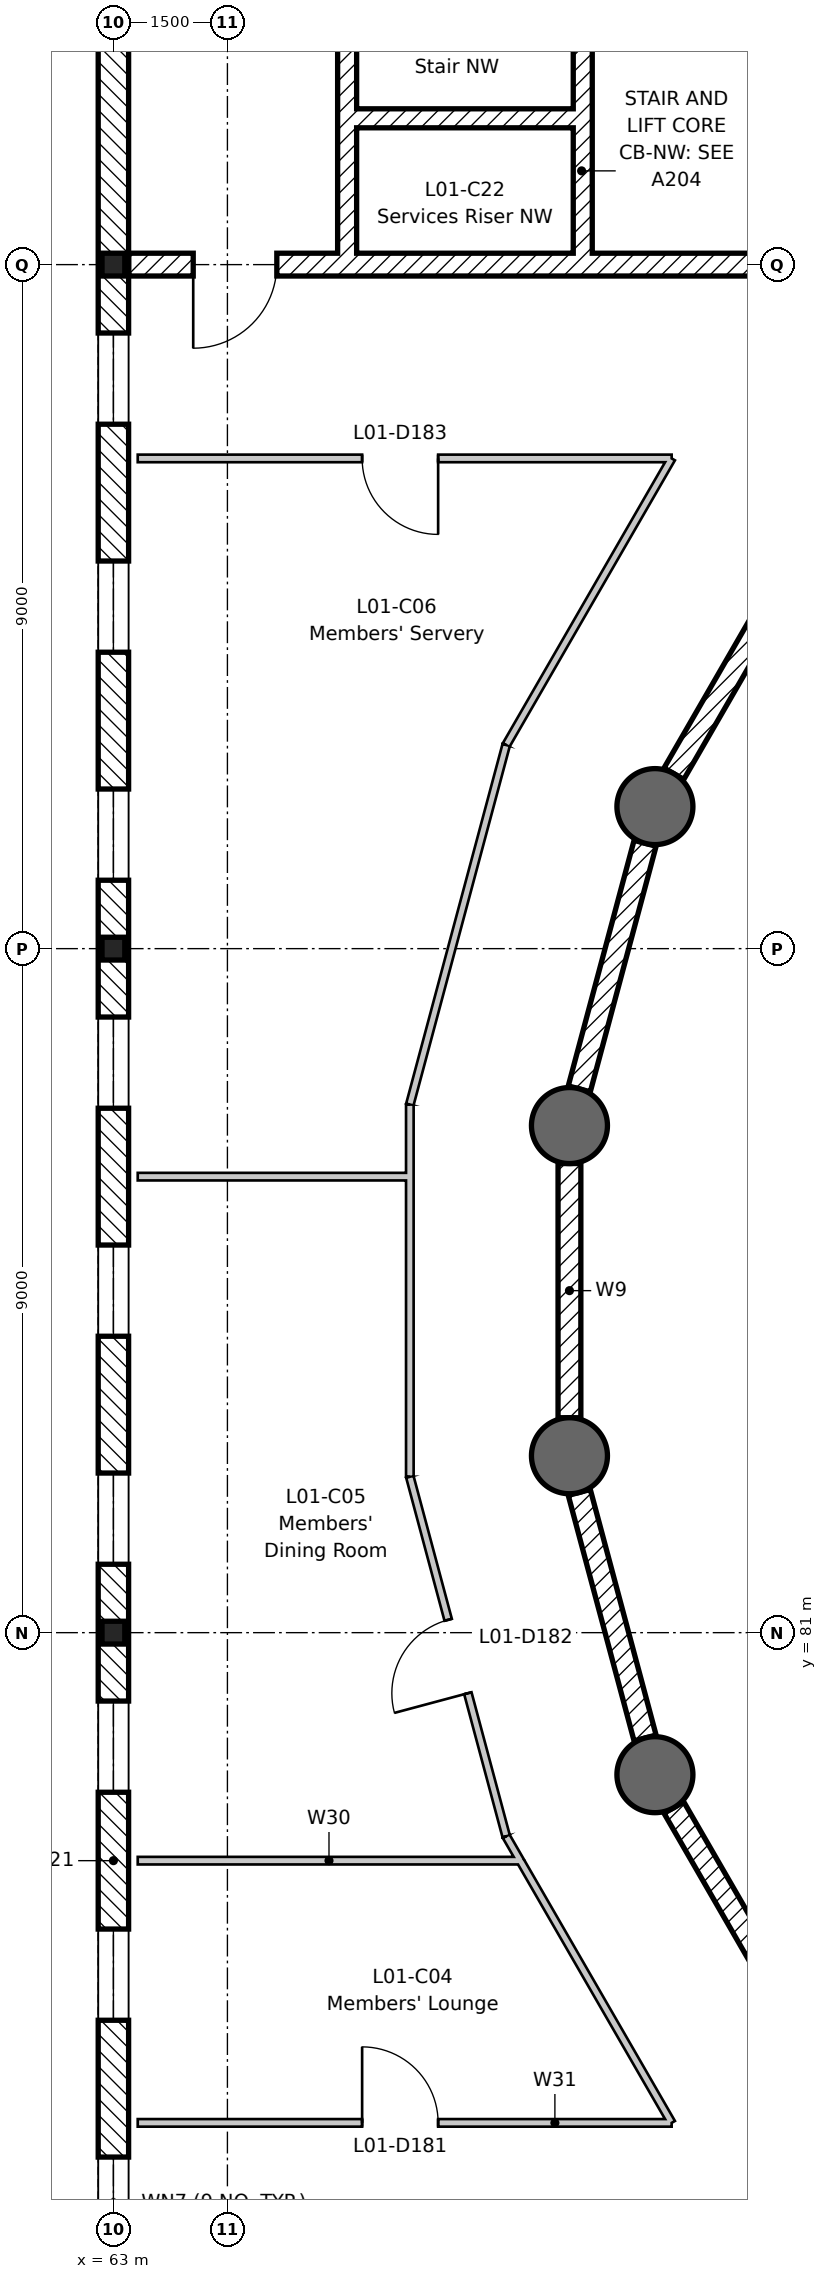
"""IFC4 building model, lengths in metres.
Left out: names, types, materials, properties, quantities, classifications, styles, units other than length and angle.
Written with IfcOpenShell. Run it as: python <this file> out.ifc"""

import sys

from ifc_helpers import new_model, si_unit, direction, frame, frame_2d, origin, origin_2d, place, context, subcontext, project, spatial, rectangle, circle, i_section, extrude, element, fill, save


model = new_model("IFC4")
c1 = context("Model", 3, precision=1e-05, world=origin(), true_north=direction((0.0, 1.0)))
c2 = subcontext(c1, "Body", "Model", "MODEL_VIEW")
j1 = project(units=[si_unit("LENGTHUNIT", "METRE"), si_unit("PLANEANGLEUNIT", "RADIAN")], contexts=[c1])
p1 = place(None, origin())
s1 = spatial("IfcSite", under=j1, at=p1, CompositionType="ELEMENT")
p2 = place(p1, origin())
s2 = spatial("IfcBuilding", under=s1, at=p2, CompositionType="ELEMENT")
p3 = place(p2, frame((0.0, 0.0, 5.4)))
s3 = spatial("IfcBuildingStorey", under=s2, at=p3, CompositionType="ELEMENT", Elevation=5.4)
for number, where, z_axis, x_axis in (
    (1, (70.125, 91.869, -0.2), (0.0, 0.0, 1.0), (1.0, 0.0, 0.0)),
    (2, (69.0, 87.672, -0.2), (0.0, 0.0, 1.0), (1.0, 0.0, 0.0)),
    (3, (69.0, 83.328, -0.2), (0.0, 0.0, 1.0), (1.0, 0.0, 0.0)),
    (4, (70.125, 79.131, -0.2), (0.0, 0.0, 1.0), (1.0, 0.0, 0.0)),
):
    element("IfcColumn", number, at=place(p3, frame(where, z_axis=z_axis, x_axis=x_axis)), inside=s3, PredefinedType="COLUMN", context=c2, shape_type="SweptSolid", body=[
        extrude(circle(Radius=0.5, at=origin_2d()), origin(), (0.0, 0.0, 1.0), 2.7),
    ])
for number, where, z_axis, x_axis in (
    (5, (63.0, 81.0, -0.2), (0.0, 0.0, 1.0), (1.0, 0.0, 0.0)),
    (6, (63.0, 90.0, -0.2), (0.0, 0.0, 1.0), (1.0, 0.0, 0.0)),
    (7, (63.0, 99.0, -0.2), (0.0, 0.0, 1.0), (1.0, 0.0, 0.0)),
):
    element("IfcColumn", number, at=place(p3, frame(where, z_axis=z_axis, x_axis=x_axis)), inside=s3, PredefinedType="COLUMN", context=c2, shape_type="SweptSolid", body=[
        extrude(i_section(OverallWidth=0.3, OverallDepth=0.3, WebThickness=0.011, FlangeThickness=0.019, FilletRadius=0.027, at=origin_2d()), origin(), (0.0, 0.0, 1.0), 4.5),
    ])
for number, where, z_axis, x_axis in (
    (8, (72.047, 95.198, 0.0), (0.0, 0.0, 1.0), (-0.5, -0.866, 0.0)),
    (9, (69.995, 91.386, 0.0), (0.0, 0.0, 1.0), (-0.259, -0.966, 0.0)),
):
    element("IfcWall", number, at=place(p3, frame(where, z_axis=z_axis, x_axis=x_axis)), inside=s3, PredefinedType="PARTITIONING", context=c2, shape_type="SweptSolid", body=[
        extrude(rectangle(XDim=3.344, YDim=0.3, at=frame_2d((1.672, 0.0))), origin(), (0.0, 0.0, 1.0), 2.5),
    ])
p4 = place(p3, frame((69.0, 87.172, 0.0), z_axis=(0.0, 0.0, 1.0), x_axis=(0.0, -1.0, 0.0)))
e10 = element("IfcWall", 10, at=p4, inside=s3, PredefinedType="PARTITIONING", context=c2, shape_type="SweptSolid", body=[
    extrude(rectangle(XDim=3.345, YDim=0.3, at=frame_2d((1.672, 0.0))), origin(), (0.0, 0.0, 1.0), 2.5),
])
for number, where, z_axis, x_axis in (
    (11, (69.129, 82.845, 0.0), (0.0, 0.0, 1.0), (0.259, -0.966, 0.0)),
    (12, (70.375, 78.698, 0.0), (0.0, 0.0, 1.0), (0.5, -0.866, 0.0)),
):
    element("IfcWall", number, at=place(p3, frame(where, z_axis=z_axis, x_axis=x_axis)), inside=s3, PredefinedType="PARTITIONING", context=c2, shape_type="SweptSolid", body=[
        extrude(rectangle(XDim=3.344, YDim=0.3, at=frame_2d((1.672, 0.0))), origin(), (0.0, 0.0, 1.0), 2.5),
    ])
p5 = place(p3, frame((63.2, 99.0, 0.0), z_axis=(0.0, 0.0, 1.0), x_axis=(1.0, 0.0, 0.0)))
e13 = element("IfcWall", 13, at=p5, inside=s3, PredefinedType="SHEAR", context=c2, shape_type="SweptSolid", body=[
    extrude(rectangle(XDim=8.95, YDim=0.3, at=frame_2d((4.475, 0.0))), origin(), (0.0, 0.0, 1.0), 4.3),
])
p6 = place(p5, frame((0.85, 0.0, 0.0)))
e14 = element("IfcOpeningElement", 14, at=p6, cuts=e13, PredefinedType="OPENING", context=c2, shape_type="SweptSolid", body=[
    extrude(rectangle(XDim=1.1, YDim=2.1, at=frame_2d((0.55, 1.05))), frame((0.0, 0.16, 0.0), z_axis=(0.0, -1.0, 0.0), x_axis=(1.0, 0.0, 0.0)), (0.0, 0.0, 1.0), 0.32),
])
p7 = place(p3, frame((66.075, 107.8, 0.0), z_axis=(0.0, 0.0, 1.0), x_axis=(0.0, -1.0, 0.0)))
e15 = element("IfcWall", 15, at=p7, inside=s3, PredefinedType="SHEAR", context=c2, shape_type="SweptSolid", body=[
    extrude(rectangle(XDim=8.65, YDim=0.25, at=frame_2d((4.325, 0.0))), origin(), (0.0, 0.0, 1.0), 4.3),
])
p8 = place(p7, frame((0.4, 0.0, 0.0)))
e16 = element("IfcOpeningElement", 16, at=p8, cuts=e15, PredefinedType="OPENING", context=c2, shape_type="SweptSolid", body=[
    extrude(rectangle(XDim=1.0, YDim=2.1, at=frame_2d((0.5, 1.05))), frame((0.0, 0.135, 0.0), z_axis=(0.0, -1.0, 0.0), x_axis=(1.0, 0.0, 0.0)), (0.0, 0.0, 1.0), 0.27),
])
p9 = place(p3, frame((69.175, 107.8, 0.0), z_axis=(0.0, 0.0, 1.0), x_axis=(0.0, -1.0, 0.0)))
e17 = element("IfcWall", 17, at=p9, inside=s3, PredefinedType="SHEAR", context=c2, shape_type="SweptSolid", body=[
    extrude(rectangle(XDim=8.65, YDim=0.25, at=frame_2d((4.325, 0.0))), origin(), (0.0, 0.0, 1.0), 4.3),
])
p10 = place(p3, frame((66.2, 100.925, 0.0), z_axis=(0.0, 0.0, 1.0), x_axis=(1.0, 0.0, 0.0)))
e18 = element("IfcWall", 18, at=p10, inside=s3, PredefinedType="SHEAR", context=c2, shape_type="SweptSolid", body=[
    extrude(rectangle(XDim=2.85, YDim=0.25, at=frame_2d((1.425, 0.0))), origin(), (0.0, 0.0, 1.0), 4.3),
])
p11 = place(p3, frame((63.0, 72.0, 0.0), z_axis=(0.0, 0.0, 1.0), x_axis=(0.0, 1.0, 0.0)))
e19 = element("IfcWall", 19, at=p11, inside=s3, PredefinedType="STANDARD", context=c2, shape_type="SweptSolid", body=[
    extrude(rectangle(XDim=27.0, YDim=0.4, at=frame_2d((13.5, 0.0))), origin(), (0.0, 0.0, 1.0), 3.81),
])
p12 = place(p11, frame((0.9, 0.0, 0.9)))
e20 = element("IfcOpeningElement", 20, at=p12, cuts=e19, PredefinedType="OPENING", context=c2, shape_type="SweptSolid", body=[
    extrude(rectangle(XDim=1.2, YDim=2.4, at=frame_2d((0.6, 1.2))), frame((0.0, 0.21, 0.0), z_axis=(0.0, -1.0, 0.0), x_axis=(1.0, 0.0, 0.0)), (0.0, 0.0, 1.0), 0.42),
])
p13 = place(p11, frame((3.9, 0.0, 0.9)))
e21 = element("IfcOpeningElement", 21, at=p13, cuts=e19, PredefinedType="OPENING", context=c2, shape_type="SweptSolid", body=[
    extrude(rectangle(XDim=1.2, YDim=2.4, at=frame_2d((0.6, 1.2))), frame((0.0, 0.21, 0.0), z_axis=(0.0, -1.0, 0.0), x_axis=(1.0, 0.0, 0.0)), (0.0, 0.0, 1.0), 0.42),
])
p14 = place(p11, frame((6.9, 0.0, 0.9)))
e22 = element("IfcOpeningElement", 22, at=p14, cuts=e19, PredefinedType="OPENING", context=c2, shape_type="SweptSolid", body=[
    extrude(rectangle(XDim=1.2, YDim=2.4, at=frame_2d((0.6, 1.2))), frame((0.0, 0.21, 0.0), z_axis=(0.0, -1.0, 0.0), x_axis=(1.0, 0.0, 0.0)), (0.0, 0.0, 1.0), 0.42),
])
p15 = place(p11, frame((9.9, 0.0, 0.9)))
e23 = element("IfcOpeningElement", 23, at=p15, cuts=e19, PredefinedType="OPENING", context=c2, shape_type="SweptSolid", body=[
    extrude(rectangle(XDim=1.2, YDim=2.4, at=frame_2d((0.6, 1.2))), frame((0.0, 0.21, 0.0), z_axis=(0.0, -1.0, 0.0), x_axis=(1.0, 0.0, 0.0)), (0.0, 0.0, 1.0), 0.42),
])
p16 = place(p11, frame((12.9, 0.0, 0.9)))
e24 = element("IfcOpeningElement", 24, at=p16, cuts=e19, PredefinedType="OPENING", context=c2, shape_type="SweptSolid", body=[
    extrude(rectangle(XDim=1.2, YDim=2.4, at=frame_2d((0.6, 1.2))), frame((0.0, 0.21, 0.0), z_axis=(0.0, -1.0, 0.0), x_axis=(1.0, 0.0, 0.0)), (0.0, 0.0, 1.0), 0.42),
])
p17 = place(p11, frame((15.9, 0.0, 0.9)))
e25 = element("IfcOpeningElement", 25, at=p17, cuts=e19, PredefinedType="OPENING", context=c2, shape_type="SweptSolid", body=[
    extrude(rectangle(XDim=1.2, YDim=2.4, at=frame_2d((0.6, 1.2))), frame((0.0, 0.21, 0.0), z_axis=(0.0, -1.0, 0.0), x_axis=(1.0, 0.0, 0.0)), (0.0, 0.0, 1.0), 0.42),
])
p18 = place(p11, frame((18.9, 0.0, 0.9)))
e26 = element("IfcOpeningElement", 26, at=p18, cuts=e19, PredefinedType="OPENING", context=c2, shape_type="SweptSolid", body=[
    extrude(rectangle(XDim=1.2, YDim=2.4, at=frame_2d((0.6, 1.2))), frame((0.0, 0.21, 0.0), z_axis=(0.0, -1.0, 0.0), x_axis=(1.0, 0.0, 0.0)), (0.0, 0.0, 1.0), 0.42),
])
p19 = place(p11, frame((21.9, 0.0, 0.9)))
e27 = element("IfcOpeningElement", 27, at=p19, cuts=e19, PredefinedType="OPENING", context=c2, shape_type="SweptSolid", body=[
    extrude(rectangle(XDim=1.2, YDim=2.4, at=frame_2d((0.6, 1.2))), frame((0.0, 0.21, 0.0), z_axis=(0.0, -1.0, 0.0), x_axis=(1.0, 0.0, 0.0)), (0.0, 0.0, 1.0), 0.42),
])
p20 = place(p11, frame((24.9, 0.0, 0.9)))
e28 = element("IfcOpeningElement", 28, at=p20, cuts=e19, PredefinedType="OPENING", context=c2, shape_type="SweptSolid", body=[
    extrude(rectangle(XDim=1.2, YDim=2.4, at=frame_2d((0.6, 1.2))), frame((0.0, 0.21, 0.0), z_axis=(0.0, -1.0, 0.0), x_axis=(1.0, 0.0, 0.0)), (0.0, 0.0, 1.0), 0.42),
])
p21 = place(p3, frame((63.0, 99.0, 0.0), z_axis=(0.0, 0.0, 1.0), x_axis=(0.0, 1.0, 0.0)))
e29 = element("IfcWall", 29, at=p21, inside=s3, PredefinedType="STANDARD", context=c2, shape_type="SweptSolid", body=[
    extrude(rectangle(XDim=4.4, YDim=0.4, at=frame_2d((2.2, 0.0))), origin(), (0.0, 0.0, 1.0), 4.3),
])
p22 = place(p3, frame((68.353, 78.0, 0.0), z_axis=(0.0, 0.0, 1.0), x_axis=(-1.0, 0.0, 0.0)))
e30 = element("IfcWall", 30, at=p22, inside=s3, PredefinedType="PARTITIONING", context=c2, shape_type="SweptSolid", body=[
    extrude(rectangle(XDim=5.033, YDim=0.1, at=frame_2d((2.516, 0.0))), origin(), (0.0, 0.0, 1.0), 3.81),
])
p23 = place(p3, frame((63.32, 74.55, 0.0), z_axis=(0.0, 0.0, 1.0), x_axis=(1.0, 0.0, 0.0)))
e31 = element("IfcWall", 31, at=p23, inside=s3, PredefinedType="PARTITIONING", context=c2, shape_type="SweptSolid", body=[
    extrude(rectangle(XDim=7.024, YDim=0.1, at=frame_2d((3.512, 0.0))), origin(), (0.0, 0.0, 1.0), 3.81),
])
p24 = place(p23, frame((2.952, 0.0, 0.0)))
e32 = element("IfcOpeningElement", 32, at=p24, cuts=e31, PredefinedType="OPENING", context=c2, shape_type="SweptSolid", body=[
    extrude(rectangle(XDim=1.0, YDim=2.1, at=frame_2d((0.5, 1.05))), frame((0.0, 0.06, 0.0), z_axis=(0.0, -1.0, 0.0), x_axis=(1.0, 0.0, 0.0)), (0.0, 0.0, 1.0), 0.12),
])
p25 = place(p3, frame((70.344, 74.55, 0.0), z_axis=(0.0, 0.0, 1.0), x_axis=(-0.500005512359, 0.866022221199, 0.0)))
e33 = element("IfcWall", 33, at=p25, inside=s3, PredefinedType="PARTITIONING", context=c2, shape_type="SweptSolid", body=[
    extrude(rectangle(XDim=4.007, YDim=0.1, at=frame_2d((2.003, 0.0))), origin(), (0.0, 0.0, 1.0), 3.81),
])
p26 = place(p3, frame((66.9, 87.0, 0.0), z_axis=(0.0, 0.0, 1.0), x_axis=(-1.0, 0.0, 0.0)))
e34 = element("IfcWall", 34, at=p26, inside=s3, PredefinedType="PARTITIONING", context=c2, shape_type="SweptSolid", body=[
    extrude(rectangle(XDim=3.58, YDim=0.1, at=frame_2d((1.79, 0.0))), origin(), (0.0, 0.0, 1.0), 3.81),
])
p27 = place(p3, frame((68.363, 77.983, 0.0), z_axis=(0.0, 0.0, 1.0), x_axis=(-0.500173430036, 0.86592525075, 0.0)))
e35 = element("IfcWall", 35, at=p27, inside=s3, PredefinedType="PARTITIONING", context=c2, shape_type="SweptSolid", body=[
    extrude(rectangle(XDim=0.39, YDim=0.1, at=frame_2d((0.195, 0.0))), origin(), (0.0, 0.0, 1.0), 3.81),
])
p28 = place(p3, frame((68.167, 78.321, 0.0), z_axis=(0.0, 0.0, 1.0), x_axis=(-0.258829112515, 0.965923128678, 0.0)))
e36 = element("IfcWall", 36, at=p28, inside=s3, PredefinedType="PARTITIONING", context=c2, shape_type="SweptSolid", body=[
    extrude(rectangle(XDim=4.897, YDim=0.1, at=frame_2d((2.449, 0.0))), origin(), (0.0, 0.0, 1.0), 3.81),
])
p29 = place(p28, frame((1.949, 0.0, 0.0)))
e37 = element("IfcOpeningElement", 37, at=p29, cuts=e36, PredefinedType="OPENING", context=c2, shape_type="SweptSolid", body=[
    extrude(rectangle(XDim=1.0, YDim=2.1, at=frame_2d((0.5, 1.05))), frame((0.0, 0.06, 0.0), z_axis=(0.0, -1.0, 0.0), x_axis=(1.0, 0.0, 0.0)), (0.0, 0.0, 1.0), 0.12),
])
p30 = place(p3, frame((66.9, 83.051, 0.0), z_axis=(0.0, 0.0, 1.0), x_axis=(0.0, 1.0, 0.0)))
e38 = element("IfcWall", 38, at=p30, inside=s3, PredefinedType="PARTITIONING", context=c2, shape_type="SweptSolid", body=[
    extrude(rectangle(XDim=3.969, YDim=0.1, at=frame_2d((1.984, 0.0))), origin(), (0.0, 0.0, 1.0), 3.81),
])
p31 = place(p3, frame((66.9, 86.98, 0.0), z_axis=(0.0, 0.0, 1.0), x_axis=(0.0, 1.0, 0.0)))
e39 = element("IfcWall", 39, at=p31, inside=s3, PredefinedType="PARTITIONING", context=c2, shape_type="SweptSolid", body=[
    extrude(rectangle(XDim=0.969, YDim=0.1, at=frame_2d((0.484, 0.0))), origin(), (0.0, 0.0, 1.0), 3.81),
])
p32 = place(p3, frame((66.9, 87.949, 0.0), z_axis=(0.0, 0.0, 1.0), x_axis=(0.258829112515, 0.965923128678, 0.0)))
e40 = element("IfcWall", 40, at=p32, inside=s3, PredefinedType="PARTITIONING", context=c2, shape_type="SweptSolid", body=[
    extrude(rectangle(XDim=4.897, YDim=0.1, at=frame_2d((2.449, 0.0))), origin(), (0.0, 0.0, 1.0), 3.81),
])
p33 = place(p3, frame((68.167, 92.679, 0.0), z_axis=(0.0, 0.0, 1.0), x_axis=(0.499992644437, 0.866029650479, 0.0)))
e41 = element("IfcWall", 41, at=p33, inside=s3, PredefinedType="PARTITIONING", context=c2, shape_type="SweptSolid", body=[
    extrude(rectangle(XDim=4.354, YDim=0.1, at=frame_2d((2.177, 0.0))), origin(), (0.0, 0.0, 1.0), 3.81),
])
p34 = place(p3, frame((70.344, 96.45, 0.0), z_axis=(0.0, 0.0, 1.0), x_axis=(-1.0, 0.0, 0.0)))
e42 = element("IfcWall", 42, at=p34, inside=s3, PredefinedType="PARTITIONING", context=c2, shape_type="SweptSolid", body=[
    extrude(rectangle(XDim=7.024, YDim=0.1, at=frame_2d((3.512, 0.0))), origin(), (0.0, 0.0, 1.0), 3.81),
])
p35 = place(p34, frame((3.072, 0.0, 0.0)))
e43 = element("IfcOpeningElement", 43, at=p35, cuts=e42, PredefinedType="OPENING", context=c2, shape_type="SweptSolid", body=[
    extrude(rectangle(XDim=1.0, YDim=2.1, at=frame_2d((0.5, 1.05))), frame((0.0, 0.06, 0.0), z_axis=(0.0, -1.0, 0.0), x_axis=(1.0, 0.0, 0.0)), (0.0, 0.0, 1.0), 0.12),
])
p36 = place(p12, origin())
e44 = element("IfcWindow", 44, at=p36, inside=s3, PartitioningType="SINGLE_PANEL", PredefinedType="WINDOW", context=c2, shape_type="SweptSolid", body=[
    extrude(rectangle(XDim=1.2, YDim=2.4, at=frame_2d((0.6, 1.2))), frame((0.0, 0.03, 0.0), z_axis=(0.0, -1.0, 0.0), x_axis=(1.0, 0.0, 0.0)), (0.0, 0.0, 1.0), 0.06),
])
fill(e20, e44)
p37 = place(p13, origin())
e45 = element("IfcWindow", 45, at=p37, inside=s3, PartitioningType="SINGLE_PANEL", PredefinedType="WINDOW", context=c2, shape_type="SweptSolid", body=[
    extrude(rectangle(XDim=1.2, YDim=2.4, at=frame_2d((0.6, 1.2))), frame((0.0, 0.03, 0.0), z_axis=(0.0, -1.0, 0.0), x_axis=(1.0, 0.0, 0.0)), (0.0, 0.0, 1.0), 0.06),
])
fill(e21, e45)
p38 = place(p14, origin())
e46 = element("IfcWindow", 46, at=p38, inside=s3, PartitioningType="SINGLE_PANEL", PredefinedType="WINDOW", context=c2, shape_type="SweptSolid", body=[
    extrude(rectangle(XDim=1.2, YDim=2.4, at=frame_2d((0.6, 1.2))), frame((0.0, 0.03, 0.0), z_axis=(0.0, -1.0, 0.0), x_axis=(1.0, 0.0, 0.0)), (0.0, 0.0, 1.0), 0.06),
])
fill(e22, e46)
p39 = place(p15, origin())
e47 = element("IfcWindow", 47, at=p39, inside=s3, PartitioningType="SINGLE_PANEL", PredefinedType="WINDOW", context=c2, shape_type="SweptSolid", body=[
    extrude(rectangle(XDim=1.2, YDim=2.4, at=frame_2d((0.6, 1.2))), frame((0.0, 0.03, 0.0), z_axis=(0.0, -1.0, 0.0), x_axis=(1.0, 0.0, 0.0)), (0.0, 0.0, 1.0), 0.06),
])
fill(e23, e47)
p40 = place(p16, origin())
e48 = element("IfcWindow", 48, at=p40, inside=s3, PartitioningType="SINGLE_PANEL", PredefinedType="WINDOW", context=c2, shape_type="SweptSolid", body=[
    extrude(rectangle(XDim=1.2, YDim=2.4, at=frame_2d((0.6, 1.2))), frame((0.0, 0.03, 0.0), z_axis=(0.0, -1.0, 0.0), x_axis=(1.0, 0.0, 0.0)), (0.0, 0.0, 1.0), 0.06),
])
fill(e24, e48)
p41 = place(p17, origin())
e49 = element("IfcWindow", 49, at=p41, inside=s3, PartitioningType="SINGLE_PANEL", PredefinedType="WINDOW", context=c2, shape_type="SweptSolid", body=[
    extrude(rectangle(XDim=1.2, YDim=2.4, at=frame_2d((0.6, 1.2))), frame((0.0, 0.03, 0.0), z_axis=(0.0, -1.0, 0.0), x_axis=(1.0, 0.0, 0.0)), (0.0, 0.0, 1.0), 0.06),
])
fill(e25, e49)
p42 = place(p18, origin())
e50 = element("IfcWindow", 50, at=p42, inside=s3, PartitioningType="SINGLE_PANEL", PredefinedType="WINDOW", context=c2, shape_type="SweptSolid", body=[
    extrude(rectangle(XDim=1.2, YDim=2.4, at=frame_2d((0.6, 1.2))), frame((0.0, 0.03, 0.0), z_axis=(0.0, -1.0, 0.0), x_axis=(1.0, 0.0, 0.0)), (0.0, 0.0, 1.0), 0.06),
])
fill(e26, e50)
p43 = place(p19, origin())
e51 = element("IfcWindow", 51, at=p43, inside=s3, PartitioningType="SINGLE_PANEL", PredefinedType="WINDOW", context=c2, shape_type="SweptSolid", body=[
    extrude(rectangle(XDim=1.2, YDim=2.4, at=frame_2d((0.6, 1.2))), frame((0.0, 0.03, 0.0), z_axis=(0.0, -1.0, 0.0), x_axis=(1.0, 0.0, 0.0)), (0.0, 0.0, 1.0), 0.06),
])
fill(e27, e51)
p44 = place(p20, origin())
e52 = element("IfcWindow", 52, at=p44, inside=s3, PartitioningType="SINGLE_PANEL", PredefinedType="WINDOW", context=c2, shape_type="SweptSolid", body=[
    extrude(rectangle(XDim=1.2, YDim=2.4, at=frame_2d((0.6, 1.2))), frame((0.0, 0.03, 0.0), z_axis=(0.0, -1.0, 0.0), x_axis=(1.0, 0.0, 0.0)), (0.0, 0.0, 1.0), 0.06),
])
fill(e28, e52)
p45 = place(p6, frame((1.1, 0.0, 0.0), z_axis=(0.0, 0.0, 1.0), x_axis=(-1.0, 0.0, 0.0)))
e53 = element("IfcDoor", 53, at=p45, inside=s3, OperationType="SINGLE_SWING_RIGHT", PredefinedType="DOOR", context=c2, shape_type="SweptSolid", body=[
    extrude(rectangle(XDim=1.1, YDim=2.1, at=frame_2d((0.55, 1.05))), frame((0.0, 0.025, 0.0), z_axis=(0.0, -1.0, 0.0), x_axis=(1.0, 0.0, 0.0)), (0.0, 0.0, 1.0), 0.05),
])
fill(e14, e53)
p46 = place(p24, origin())
e54 = element("IfcDoor", 54, at=p46, inside=s3, OperationType="SINGLE_SWING_LEFT", PredefinedType="DOOR", context=c2, shape_type="SweptSolid", body=[
    extrude(rectangle(XDim=1.0, YDim=2.1, at=frame_2d((0.5, 1.05))), frame((0.0, 0.025, 0.0), z_axis=(0.0, -1.0, 0.0), x_axis=(1.0, 0.0, 0.0)), (0.0, 0.0, 1.0), 0.05),
])
fill(e32, e54)
p47 = place(p29, origin())
e55 = element("IfcDoor", 55, at=p47, inside=s3, OperationType="SINGLE_SWING_LEFT", PredefinedType="DOOR", context=c2, shape_type="SweptSolid", body=[
    extrude(rectangle(XDim=1.0, YDim=2.1, at=frame_2d((0.5, 1.05))), frame((0.0, 0.025, 0.0), z_axis=(0.0, -1.0, 0.0), x_axis=(1.0, 0.0, 0.0)), (0.0, 0.0, 1.0), 0.05),
])
fill(e37, e55)
p48 = place(p35, origin())
e56 = element("IfcDoor", 56, at=p48, inside=s3, OperationType="SINGLE_SWING_LEFT", PredefinedType="DOOR", context=c2, shape_type="SweptSolid", body=[
    extrude(rectangle(XDim=1.0, YDim=2.1, at=frame_2d((0.5, 1.05))), frame((0.0, 0.025, 0.0), z_axis=(0.0, -1.0, 0.0), x_axis=(1.0, 0.0, 0.0)), (0.0, 0.0, 1.0), 0.05),
])
fill(e43, e56)
save(model, sys.argv[1])
